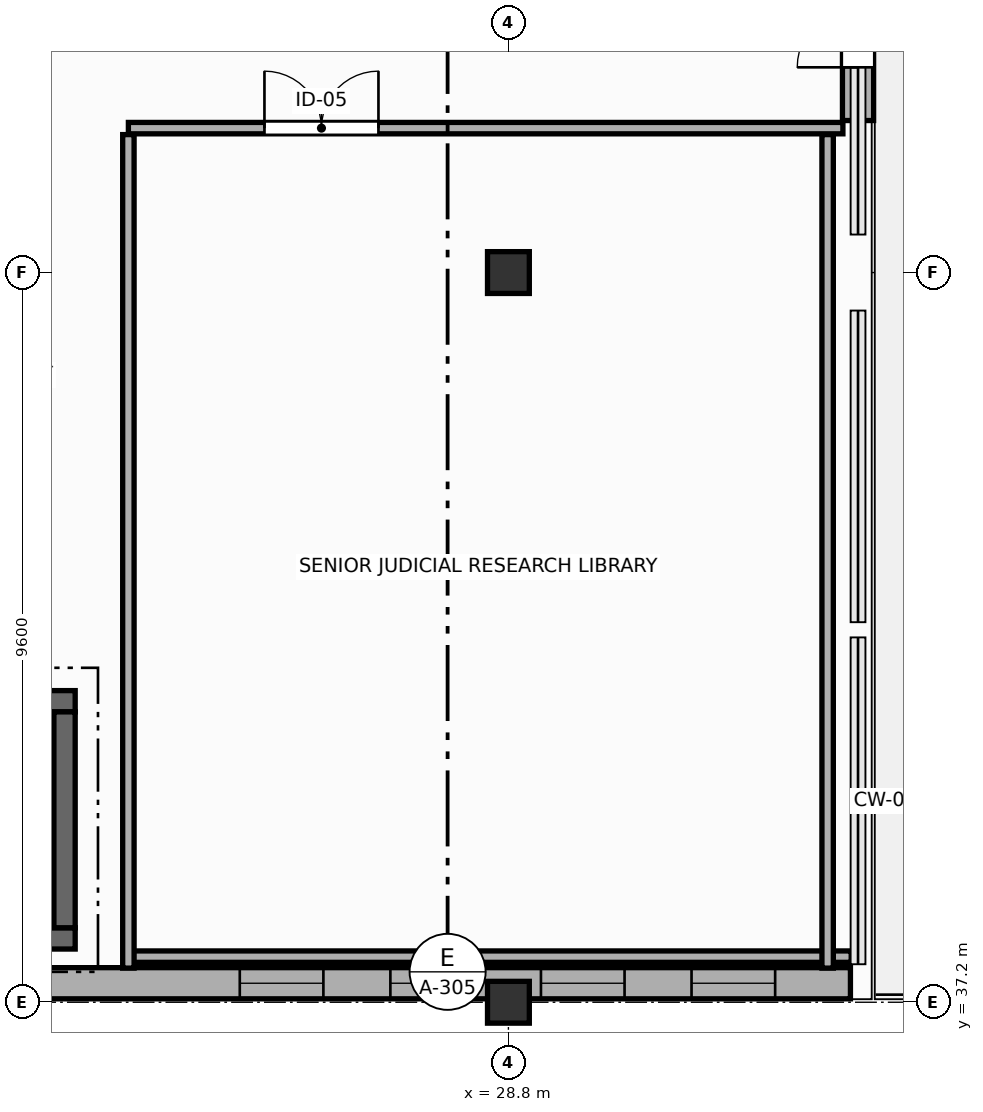
"""IFC4 building model, lengths in metres.
Left out: names, types, materials, properties, quantities, classifications, styles, units other than length and angle.
Written with IfcOpenShell. Run it as: python <this file> out.ifc"""

import sys

from ifc_helpers import new_model, si_unit, direction, frame, frame_2d, origin, origin_2d, place, context, subcontext, project, spatial, rectangle, extrude, element, fill, save


model = new_model("IFC4")
c1 = context("Model", 3, precision=1e-05, world=origin(), true_north=direction((0.0, 1.0)))
c2 = subcontext(c1, "Body", "Model", "MODEL_VIEW")
j1 = project(units=[si_unit("LENGTHUNIT", "METRE"), si_unit("PLANEANGLEUNIT", "RADIAN")], contexts=[c1])
p1 = place(None, origin())
s1 = spatial("IfcSite", under=j1, at=p1, CompositionType="ELEMENT")
p2 = place(p1, origin())
s2 = spatial("IfcBuilding", under=s1, at=p2, CompositionType="ELEMENT")
p3 = place(p2, frame((0.0, 0.0, 18.6)))
s3 = spatial("IfcBuildingStorey", under=s2, at=p3, CompositionType="ELEMENT", Elevation=18.6)
for number, where, z_axis, x_axis in (
    (1, (28.8, 37.2, 0.0), (0.0, 0.0, 1.0), (1.0, 0.0, 0.0)),
    (2, (28.8, 46.8, 0.0), (0.0, 0.0, 1.0), (1.0, 0.0, 0.0)),
):
    element("IfcColumn", number, at=place(p3, frame(where, z_axis=z_axis, x_axis=x_axis)), inside=s3, PredefinedType="COLUMN", context=c2, shape_type="SweptSolid", body=[
        extrude(rectangle(XDim=0.55, YDim=0.55, at=origin_2d()), origin(), (0.0, 0.0, 1.0), 4.2),
    ])
p4 = place(p3, frame((33.4, 48.8, 0.0), z_axis=(0.0, 0.0, 1.0), x_axis=(0.0, 1.0, 0.0)))
e3 = element("IfcWall", 3, at=p4, inside=s3, PredefinedType="STANDARD", context=c2, shape_type="SweptSolid", body=[
    extrude(rectangle(XDim=3.0, YDim=0.41, at=frame_2d((1.5, 0.0))), origin(), (0.0, 0.0, 1.0), 3.96),
])
p5 = place(p4, frame((0.7, 0.0, 0.0)))
e4 = element("IfcOpeningElement", 4, at=p5, cuts=e3, PredefinedType="OPENING", context=c2, shape_type="SweptSolid", body=[
    extrude(rectangle(XDim=1.6, YDim=2.2, at=frame_2d((0.8, 1.1))), frame((0.0, 0.215, 0.0), z_axis=(0.0, -1.0, 0.0), x_axis=(1.0, 0.0, 0.0)), (0.0, 0.0, 1.0), 0.43),
])
p6 = place(p3, frame((33.3, 37.45, 0.0), z_axis=(0.0, 0.0, 1.0), x_axis=(-1.0, 0.0, 0.0)))
e5 = element("IfcWall", 5, at=p6, inside=s3, PredefinedType="STANDARD", context=c2, shape_type="SweptSolid", body=[
    extrude(rectangle(XDim=32.863, YDim=0.41, at=frame_2d((16.432, 0.0))), origin(), (0.0, 0.0, 1.0), 2.99),
])
p7 = place(p6, frame((0.99, 0.0, 0.9)))
e6 = element("IfcOpeningElement", 6, at=p7, cuts=e5, PredefinedType="OPENING", context=c2, shape_type="SweptSolid", body=[
    extrude(rectangle(XDim=1.1, YDim=1.85, at=frame_2d((0.55, 0.925))), frame((0.0, 0.215, 0.0), z_axis=(0.0, -1.0, 0.0), x_axis=(1.0, 0.0, 0.0)), (0.0, 0.0, 1.0), 0.43),
])
p8 = place(p6, frame((2.972, 0.0, 0.9)))
e7 = element("IfcOpeningElement", 7, at=p8, cuts=e5, PredefinedType="OPENING", context=c2, shape_type="SweptSolid", body=[
    extrude(rectangle(XDim=1.1, YDim=1.85, at=frame_2d((0.55, 0.925))), frame((0.0, 0.215, 0.0), z_axis=(0.0, -1.0, 0.0), x_axis=(1.0, 0.0, 0.0)), (0.0, 0.0, 1.0), 0.43),
])
p9 = place(p6, frame((4.953, 0.0, 0.9)))
e8 = element("IfcOpeningElement", 8, at=p9, cuts=e5, PredefinedType="OPENING", context=c2, shape_type="SweptSolid", body=[
    extrude(rectangle(XDim=1.1, YDim=1.85, at=frame_2d((0.55, 0.925))), frame((0.0, 0.215, 0.0), z_axis=(0.0, -1.0, 0.0), x_axis=(1.0, 0.0, 0.0)), (0.0, 0.0, 1.0), 0.43),
])
p10 = place(p6, frame((6.934, 0.0, 0.9)))
e9 = element("IfcOpeningElement", 9, at=p10, cuts=e5, PredefinedType="OPENING", context=c2, shape_type="SweptSolid", body=[
    extrude(rectangle(XDim=1.1, YDim=1.85, at=frame_2d((0.55, 0.925))), frame((0.0, 0.215, 0.0), z_axis=(0.0, -1.0, 0.0), x_axis=(1.0, 0.0, 0.0)), (0.0, 0.0, 1.0), 0.43),
])
p11 = place(p6, frame((10.897, 0.0, 0.9)))
e10 = element("IfcOpeningElement", 10, at=p11, cuts=e5, PredefinedType="OPENING", context=c2, shape_type="SweptSolid", body=[
    extrude(rectangle(XDim=1.1, YDim=1.85, at=frame_2d((0.55, 0.925))), frame((0.0, 0.215, 0.0), z_axis=(0.0, -1.0, 0.0), x_axis=(1.0, 0.0, 0.0)), (0.0, 0.0, 1.0), 0.43),
])
p12 = place(p6, frame((14.859, 0.0, 0.9)))
e11 = element("IfcOpeningElement", 11, at=p12, cuts=e5, PredefinedType="OPENING", context=c2, shape_type="SweptSolid", body=[
    extrude(rectangle(XDim=1.1, YDim=1.85, at=frame_2d((0.55, 0.925))), frame((0.0, 0.215, 0.0), z_axis=(0.0, -1.0, 0.0), x_axis=(1.0, 0.0, 0.0)), (0.0, 0.0, 1.0), 0.43),
])
p13 = place(p6, frame((16.841, 0.0, 0.9)))
e12 = element("IfcOpeningElement", 12, at=p13, cuts=e5, PredefinedType="OPENING", context=c2, shape_type="SweptSolid", body=[
    extrude(rectangle(XDim=1.1, YDim=1.85, at=frame_2d((0.55, 0.925))), frame((0.0, 0.215, 0.0), z_axis=(0.0, -1.0, 0.0), x_axis=(1.0, 0.0, 0.0)), (0.0, 0.0, 1.0), 0.43),
])
p14 = place(p6, frame((18.822, 0.0, 0.9)))
e13 = element("IfcOpeningElement", 13, at=p14, cuts=e5, PredefinedType="OPENING", context=c2, shape_type="SweptSolid", body=[
    extrude(rectangle(XDim=1.1, YDim=1.85, at=frame_2d((0.55, 0.925))), frame((0.0, 0.215, 0.0), z_axis=(0.0, -1.0, 0.0), x_axis=(1.0, 0.0, 0.0)), (0.0, 0.0, 1.0), 0.43),
])
p15 = place(p6, frame((20.803, 0.0, 0.9)))
e14 = element("IfcOpeningElement", 14, at=p15, cuts=e5, PredefinedType="OPENING", context=c2, shape_type="SweptSolid", body=[
    extrude(rectangle(XDim=1.1, YDim=1.85, at=frame_2d((0.55, 0.925))), frame((0.0, 0.215, 0.0), z_axis=(0.0, -1.0, 0.0), x_axis=(1.0, 0.0, 0.0)), (0.0, 0.0, 1.0), 0.43),
])
p16 = place(p6, frame((24.766, 0.0, 0.9)))
e15 = element("IfcOpeningElement", 15, at=p16, cuts=e5, PredefinedType="OPENING", context=c2, shape_type="SweptSolid", body=[
    extrude(rectangle(XDim=1.1, YDim=1.85, at=frame_2d((0.55, 0.925))), frame((0.0, 0.215, 0.0), z_axis=(0.0, -1.0, 0.0), x_axis=(1.0, 0.0, 0.0)), (0.0, 0.0, 1.0), 0.43),
])
p17 = place(p6, frame((26.747, 0.0, 0.9)))
e16 = element("IfcOpeningElement", 16, at=p17, cuts=e5, PredefinedType="OPENING", context=c2, shape_type="SweptSolid", body=[
    extrude(rectangle(XDim=1.1, YDim=1.85, at=frame_2d((0.55, 0.925))), frame((0.0, 0.215, 0.0), z_axis=(0.0, -1.0, 0.0), x_axis=(1.0, 0.0, 0.0)), (0.0, 0.0, 1.0), 0.43),
])
p18 = place(p6, frame((28.728, 0.0, 0.9)))
e17 = element("IfcOpeningElement", 17, at=p18, cuts=e5, PredefinedType="OPENING", context=c2, shape_type="SweptSolid", body=[
    extrude(rectangle(XDim=1.1, YDim=1.85, at=frame_2d((0.55, 0.925))), frame((0.0, 0.215, 0.0), z_axis=(0.0, -1.0, 0.0), x_axis=(1.0, 0.0, 0.0)), (0.0, 0.0, 1.0), 0.43),
])
p19 = place(p6, frame((30.709, 0.0, 0.9)))
e18 = element("IfcOpeningElement", 18, at=p19, cuts=e5, PredefinedType="OPENING", context=c2, shape_type="SweptSolid", body=[
    extrude(rectangle(XDim=1.1, YDim=1.85, at=frame_2d((0.55, 0.925))), frame((0.0, 0.215, 0.0), z_axis=(0.0, -1.0, 0.0), x_axis=(1.0, 0.0, 0.0)), (0.0, 0.0, 1.0), 0.43),
])
p20 = place(p3, frame((20.1, 41.16, 0.0), z_axis=(0.0, 0.0, 1.0), x_axis=(1.0, 0.0, 0.0)))
e19 = element("IfcWall", 19, at=p20, inside=s3, PredefinedType="SHEAR", context=c2, shape_type="SweptSolid", body=[
    extrude(rectangle(XDim=3.0, YDim=0.28, at=frame_2d((1.5, 0.0))), origin(), (0.0, 0.0, 1.0), 3.96),
])
p21 = place(p20, frame((0.975, 0.0, 0.0)))
e20 = element("IfcOpeningElement", 20, at=p21, cuts=e19, PredefinedType="OPENING", context=c2, shape_type="SweptSolid", body=[
    extrude(rectangle(XDim=1.05, YDim=2.2, at=frame_2d((0.525, 1.1))), frame((0.0, 0.15, 0.0), z_axis=(0.0, -1.0, 0.0), x_axis=(1.0, 0.0, 0.0)), (0.0, 0.0, 1.0), 0.3),
])
p22 = place(p3, frame((23.1, 38.04, 0.0), z_axis=(0.0, 0.0, 1.0), x_axis=(-1.0, 0.0, 0.0)))
e21 = element("IfcWall", 21, at=p22, inside=s3, PredefinedType="SHEAR", context=c2, shape_type="SweptSolid", body=[
    extrude(rectangle(XDim=3.0, YDim=0.28, at=frame_2d((1.5, 0.0))), origin(), (0.0, 0.0, 1.0), 3.96),
])
p23 = place(p3, frame((22.96, 41.02, 0.0), z_axis=(0.0, 0.0, 1.0), x_axis=(0.0, -1.0, 0.0)))
e22 = element("IfcWall", 22, at=p23, inside=s3, PredefinedType="SHEAR", context=c2, shape_type="SweptSolid", body=[
    extrude(rectangle(XDim=2.84, YDim=0.28, at=frame_2d((1.42, 0.0))), origin(), (0.0, 0.0, 1.0), 3.96),
])
p24 = place(p3, frame((23.8, 48.7, 0.0), z_axis=(0.0, 0.0, 1.0), x_axis=(1.0, 0.0, 0.0)))
e23 = element("IfcWall", 23, at=p24, inside=s3, PredefinedType="PARTITIONING", context=c2, shape_type="SweptSolid", body=[
    extrude(rectangle(XDim=9.401, YDim=0.15, at=frame_2d((4.7, 0.0))), origin(), (0.0, 0.0, 1.0), 3.14),
])
p25 = place(p24, frame((1.79, 0.0, 0.0)))
e24 = element("IfcOpeningElement", 24, at=p25, cuts=e23, PredefinedType="OPENING", context=c2, shape_type="SweptSolid", body=[
    extrude(rectangle(XDim=1.5, YDim=2.35, at=frame_2d((0.75, 1.175))), frame((0.0, 0.085, 0.0), z_axis=(0.0, -1.0, 0.0), x_axis=(1.0, 0.0, 0.0)), (0.0, 0.0, 1.0), 0.17),
])
p26 = place(p3, frame((33.31, 37.8, 0.0), z_axis=(0.0, 0.0, 1.0), x_axis=(-1.0, 0.0, 0.0)))
e25 = element("IfcWall", 25, at=p26, inside=s3, PredefinedType="PARTITIONING", context=c2, shape_type="SweptSolid", body=[
    extrude(rectangle(XDim=9.51, YDim=0.15, at=frame_2d((4.755, 0.0))), origin(), (0.0, 0.0, 1.0), 3.14),
])
p27 = place(p3, frame((23.8, 37.649, 0.0), z_axis=(0.0, 0.0, 1.0), x_axis=(0.0, 1.0, 0.0)))
e26 = element("IfcWall", 26, at=p27, inside=s3, PredefinedType="PARTITIONING", context=c2, shape_type="SweptSolid", body=[
    extrude(rectangle(XDim=10.966, YDim=0.15, at=frame_2d((5.483, 0.0))), origin(), (0.0, 0.0, 1.0), 3.29),
])
p28 = place(p3, frame((33.0, 48.615, 0.0), z_axis=(0.0, 0.0, 1.0), x_axis=(0.0, -1.0, 0.0)))
e27 = element("IfcWall", 27, at=p28, inside=s3, PredefinedType="PARTITIONING", context=c2, shape_type="SweptSolid", body=[
    extrude(rectangle(XDim=10.966, YDim=0.15, at=frame_2d((5.483, 0.0))), origin(), (0.0, 0.0, 1.0), 3.945),
])
p29 = place(p5, origin())
e28 = element("IfcDoor", 28, at=p29, inside=s3, OperationType="DOUBLE_DOOR_SINGLE_SWING", PredefinedType="DOOR", context=c2, shape_type="SweptSolid", body=[
    extrude(rectangle(XDim=1.6, YDim=2.2, at=frame_2d((0.8, 1.1))), frame((0.0, 0.025, 0.0), z_axis=(0.0, -1.0, 0.0), x_axis=(1.0, 0.0, 0.0)), (0.0, 0.0, 1.0), 0.05),
])
fill(e4, e28)
p30 = place(p7, origin())
e29 = element("IfcWindow", 29, at=p30, inside=s3, PartitioningType="SINGLE_PANEL", PredefinedType="WINDOW", context=c2, shape_type="SweptSolid", body=[
    extrude(rectangle(XDim=1.1, YDim=1.85, at=frame_2d((0.55, 0.925))), frame((0.0, 0.03, 0.0), z_axis=(0.0, -1.0, 0.0), x_axis=(1.0, 0.0, 0.0)), (0.0, 0.0, 1.0), 0.06),
])
fill(e6, e29)
p31 = place(p8, origin())
e30 = element("IfcWindow", 30, at=p31, inside=s3, PartitioningType="SINGLE_PANEL", PredefinedType="WINDOW", context=c2, shape_type="SweptSolid", body=[
    extrude(rectangle(XDim=1.1, YDim=1.85, at=frame_2d((0.55, 0.925))), frame((0.0, 0.03, 0.0), z_axis=(0.0, -1.0, 0.0), x_axis=(1.0, 0.0, 0.0)), (0.0, 0.0, 1.0), 0.06),
])
fill(e7, e30)
p32 = place(p9, origin())
e31 = element("IfcWindow", 31, at=p32, inside=s3, PartitioningType="SINGLE_PANEL", PredefinedType="WINDOW", context=c2, shape_type="SweptSolid", body=[
    extrude(rectangle(XDim=1.1, YDim=1.85, at=frame_2d((0.55, 0.925))), frame((0.0, 0.03, 0.0), z_axis=(0.0, -1.0, 0.0), x_axis=(1.0, 0.0, 0.0)), (0.0, 0.0, 1.0), 0.06),
])
fill(e8, e31)
p33 = place(p10, origin())
e32 = element("IfcWindow", 32, at=p33, inside=s3, PartitioningType="SINGLE_PANEL", PredefinedType="WINDOW", context=c2, shape_type="SweptSolid", body=[
    extrude(rectangle(XDim=1.1, YDim=1.85, at=frame_2d((0.55, 0.925))), frame((0.0, 0.03, 0.0), z_axis=(0.0, -1.0, 0.0), x_axis=(1.0, 0.0, 0.0)), (0.0, 0.0, 1.0), 0.06),
])
fill(e9, e32)
p34 = place(p25, origin())
e33 = element("IfcDoor", 33, at=p34, inside=s3, OperationType="DOUBLE_DOOR_SINGLE_SWING", PredefinedType="DOOR", context=c2, shape_type="SweptSolid", body=[
    extrude(rectangle(XDim=1.5, YDim=2.35, at=frame_2d((0.75, 1.175))), frame((0.0, 0.025, 0.0), z_axis=(0.0, -1.0, 0.0), x_axis=(1.0, 0.0, 0.0)), (0.0, 0.0, 1.0), 0.05),
])
fill(e24, e33)
save(model, sys.argv[1])
